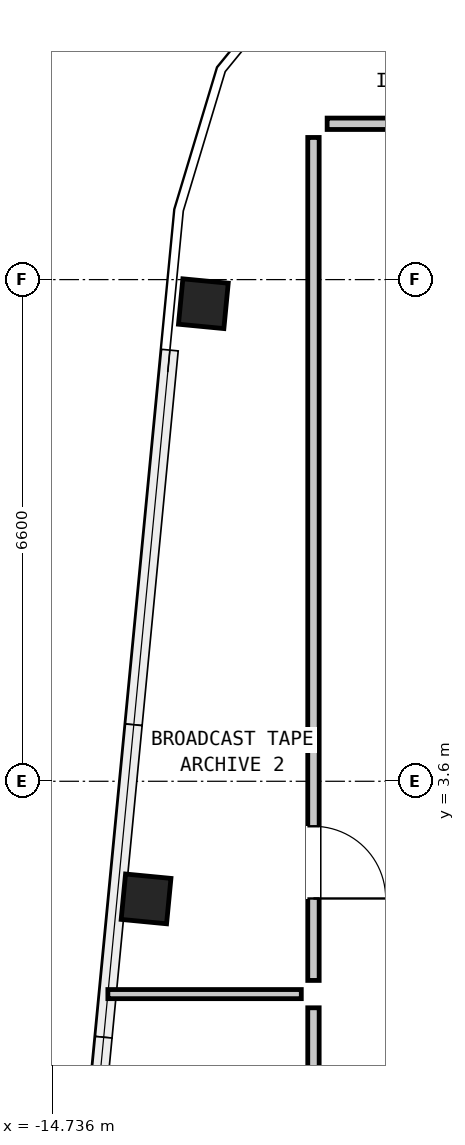
"""IFC4 building model, lengths in metres.
Left out: names, types, materials, properties, quantities, classifications, styles, units other than length and angle.
Written with IfcOpenShell. Run it as: python <this file> out.ifc"""

import sys

from ifc_helpers import new_model, si_unit, direction, frame, frame_2d, origin, origin_2d, place, context, subcontext, project, spatial, rectangle, hollow_rectangle, extrude, element, fill, save


model = new_model("IFC4")
c1 = context("Model", 3, precision=1e-05, world=origin(), true_north=direction((0.0, 1.0)))
c2 = subcontext(c1, "Body", "Model", "MODEL_VIEW")
j1 = project(units=[si_unit("LENGTHUNIT", "METRE"), si_unit("PLANEANGLEUNIT", "RADIAN")], contexts=[c1])
p1 = place(None, origin())
s1 = spatial("IfcSite", under=j1, at=p1, CompositionType="ELEMENT")
p2 = place(p1, origin())
s2 = spatial("IfcBuilding", under=s1, at=p2, CompositionType="ELEMENT")
p3 = place(p2, frame((0.0, 0.0, 264.2)))
s3 = spatial("IfcBuildingStorey", under=s2, at=p3, CompositionType="ELEMENT", Elevation=264.2)
for number, where, z_axis, x_axis in (
    (1, (-12.749, 9.883, 0.0), (0.0, 0.0, 1.0), (0.096, 0.995, 0.0)),
    (2, (-13.502, 2.052, 0.0), (0.0, 0.0, 1.0), (0.096, 0.995, 0.0)),
):
    element("IfcColumn", number, at=place(p3, frame(where, z_axis=z_axis, x_axis=x_axis)), inside=s3, PredefinedType="COLUMN", context=c2, shape_type="SweptSolid", body=[
        extrude(hollow_rectangle(XDim=0.6, YDim=0.6, WallThickness=0.04, at=origin_2d()), origin(), (0.0, 0.0, 1.0), 3.05),
    ])
p4 = place(p3, frame((-14.005, 0.8, 0.0), z_axis=(0.0, 0.0, 1.0), x_axis=(1.0, 0.0, 0.0)))
e3 = element("IfcWall", 3, at=p4, inside=s3, PredefinedType="PARTITIONING", context=c2, shape_type="SweptSolid", body=[
    extrude(rectangle(XDim=2.545, YDim=0.12, at=frame_2d((1.272, 0.0))), origin(), (0.0, 0.0, 1.0), 2.381),
])
p5 = place(p3, frame((-11.12, 12.25, 0.0), z_axis=(0.0, 0.0, 1.0), x_axis=(1.0, 0.0, 0.0)))
e4 = element("IfcWall", 4, at=p5, inside=s3, PredefinedType="PARTITIONING", context=c2, shape_type="SweptSolid", body=[
    extrude(rectangle(XDim=4.44, YDim=0.15, at=frame_2d((2.22, 0.0))), origin(), (0.0, 0.0, 1.0), 2.86),
])
p6 = place(p5, frame((2.145, 0.0, 0.0)))
e5 = element("IfcOpeningElement", 5, at=p6, cuts=e4, PredefinedType="OPENING", context=c2, shape_type="SweptSolid", body=[
    extrude(rectangle(XDim=0.95, YDim=2.1, at=frame_2d((0.475, 1.05))), frame((0.0, 0.087, 0.0), z_axis=(0.0, -1.0, 0.0), x_axis=(1.0, 0.0, 0.0)), (0.0, 0.0, 1.0), 0.174),
])
p7 = place(p3, frame((-11.3, 0.62, 0.0), z_axis=(0.0, 0.0, 1.0), x_axis=(0.0, -1.0, 0.0)))
e6 = element("IfcWall", 6, at=p7, inside=s3, PredefinedType="PARTITIONING", context=c2, shape_type="SweptSolid", body=[
    extrude(rectangle(XDim=3.44, YDim=0.15, at=frame_2d((1.72, 0.0))), origin(), (0.0, 0.0, 1.0), 2.86),
])
p8 = place(p7, frame((1.245, 0.0, 0.0)))
e7 = element("IfcOpeningElement", 7, at=p8, cuts=e6, PredefinedType="OPENING", context=c2, shape_type="SweptSolid", body=[
    extrude(rectangle(XDim=0.95, YDim=2.1, at=frame_2d((0.475, 1.05))), frame((0.0, 0.087, 0.0), z_axis=(0.0, -1.0, 0.0), x_axis=(1.0, 0.0, 0.0)), (0.0, 0.0, 1.0), 0.174),
])
p9 = place(p3, frame((-11.3, 12.07, 0.0), z_axis=(0.0, 0.0, 1.0), x_axis=(0.0, -1.0, 0.0)))
e8 = element("IfcWall", 8, at=p9, inside=s3, PredefinedType="PARTITIONING", context=c2, shape_type="SweptSolid", body=[
    extrude(rectangle(XDim=11.09, YDim=0.15, at=frame_2d((5.545, 0.0))), origin(), (0.0, 0.0, 1.0), 2.86),
])
p10 = place(p9, frame((9.062, 0.0, 0.0)))
e9 = element("IfcOpeningElement", 9, at=p10, cuts=e8, PredefinedType="OPENING", context=c2, shape_type="SweptSolid", body=[
    extrude(rectangle(XDim=0.95, YDim=2.1, at=frame_2d((0.475, 1.05))), frame((0.0, 0.087, 0.0), z_axis=(0.0, -1.0, 0.0), x_axis=(1.0, 0.0, 0.0)), (0.0, 0.0, 1.0), 0.174),
])
p11 = place(p10, origin())
e10 = element("IfcDoor", 10, at=p11, inside=s3, OperationType="SINGLE_SWING_RIGHT", PredefinedType="DOOR", context=c2, shape_type="SweptSolid", body=[
    extrude(rectangle(XDim=0.95, YDim=2.1, at=frame_2d((0.475, 1.05))), frame((0.0, 0.025, 0.0), z_axis=(0.0, -1.0, 0.0), x_axis=(1.0, 0.0, 0.0)), (0.0, 0.0, 1.0), 0.05),
])
fill(e9, e10)
save(model, sys.argv[1])
